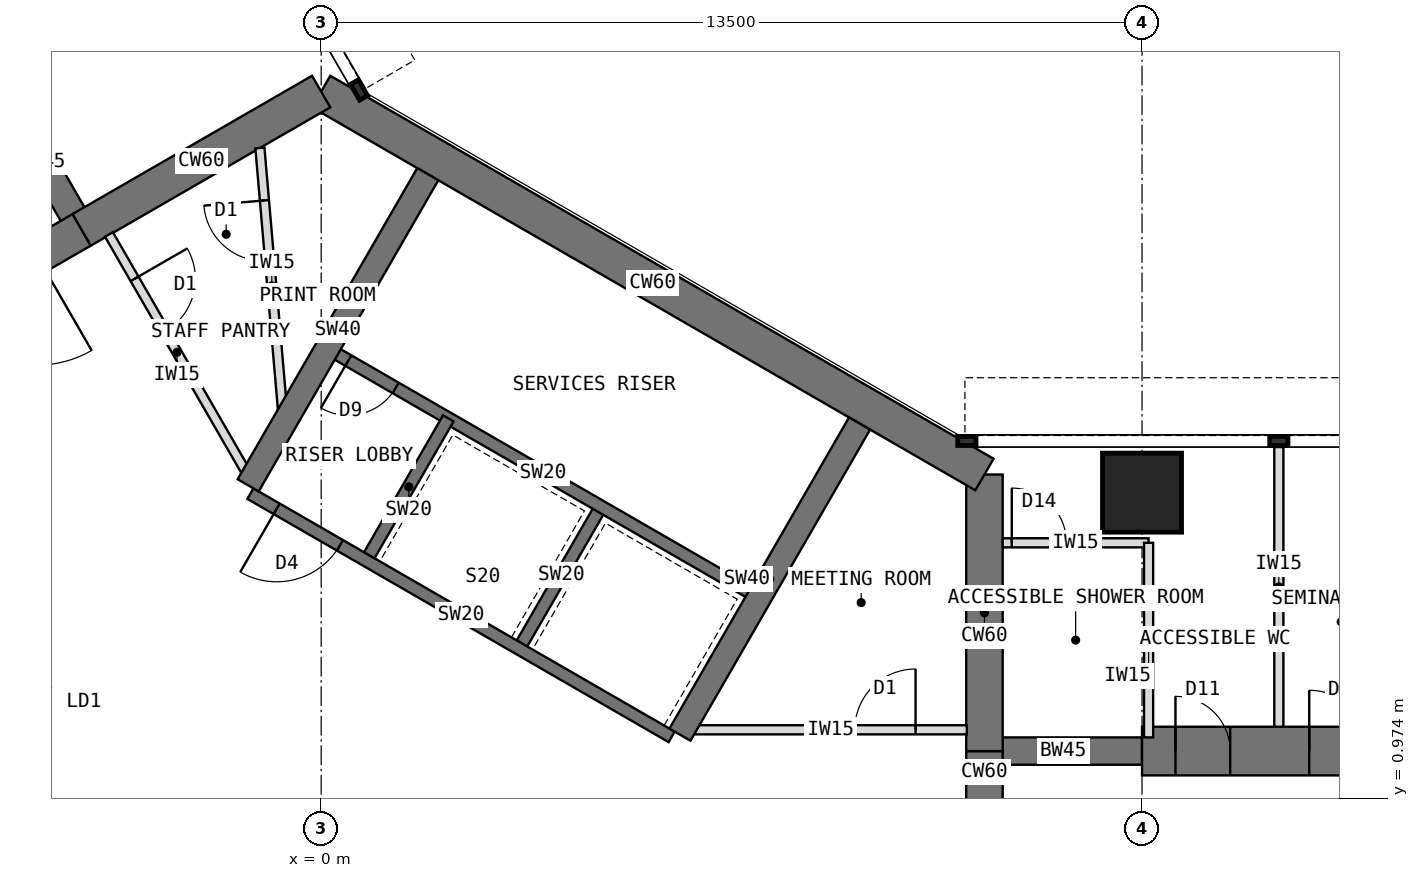
"""IFC4 building model, lengths in metres.
Left out: names, types, materials, properties, quantities, classifications, styles, units other than length and angle.
Written with IfcOpenShell. Run it as: python <this file> out.ifc"""

import sys

from ifc_helpers import new_model, si_unit, direction, frame, frame_2d, origin, origin_2d, place, context, subcontext, project, spatial, rectangle, extrude, element, fill, save


model = new_model("IFC4")
c1 = context("Model", 3, precision=1e-05, world=origin(), true_north=direction((0.0, 1.0)))
c2 = subcontext(c1, "Body", "Model", "MODEL_VIEW")
j1 = project(units=[si_unit("LENGTHUNIT", "METRE"), si_unit("PLANEANGLEUNIT", "RADIAN")], contexts=[c1])
p1 = place(None, origin())
s1 = spatial("IfcSite", under=j1, at=p1, CompositionType="ELEMENT")
p2 = place(p1, origin())
s2 = spatial("IfcBuilding", under=s1, at=p2, CompositionType="ELEMENT")
p3 = place(p2, frame((0.0, 0.0, 133.5)))
s3 = spatial("IfcBuildingStorey", under=s2, at=p3, CompositionType="ELEMENT", Elevation=133.5)
p4 = place(p3, frame((10.908, -1.75, 0.0), z_axis=(0.0, 0.0, 1.0), x_axis=(0.0, 1.0, 0.0)))
e1 = element("IfcWall", 1, at=p4, inside=s3, PredefinedType="SHEAR", context=c2, shape_type="SweptSolid", body=[
    extrude(rectangle(XDim=3.5, YDim=0.6, at=frame_2d((1.75, 0.0))), origin(), (0.0, 0.0, 1.0), 4.0),
])
p5 = place(p4, frame((0.85, 0.0, 0.0)))
e2 = element("IfcOpeningElement", 2, at=p5, cuts=e1, PredefinedType="OPENING", context=c2, shape_type="SweptSolid", body=[
    extrude(rectangle(XDim=1.8, YDim=2.1, at=frame_2d((0.9, 1.05))), frame((0.0, 0.31, 0.0), z_axis=(0.0, -1.0, 0.0), x_axis=(1.0, 0.0, 0.0)), (0.0, 0.0, 1.0), 0.62),
])
p6 = place(p3, frame((10.908, 1.75, 0.0), z_axis=(0.0, 0.0, 1.0), x_axis=(0.0, 1.0, 0.0)))
e3 = element("IfcWall", 3, at=p6, inside=s3, PredefinedType="SHEAR", context=c2, shape_type="SweptSolid", body=[
    extrude(rectangle(XDim=4.548, YDim=0.6, at=frame_2d((2.274, 0.0))), origin(), (0.0, 0.0, 1.0), 4.0),
])
p7 = place(p3, frame((10.908, 6.298, 0.0), z_axis=(0.0, 0.0, 1.0), x_axis=(-0.866021940709, 0.500005998175, 0.0)))
e4 = element("IfcWall", 4, at=p7, inside=s3, PredefinedType="SHEAR", context=c2, shape_type="SweptSolid", body=[
    extrude(rectangle(XDim=12.596, YDim=0.6, at=frame_2d((6.298, 0.0))), origin(), (0.0, 0.0, 1.0), 4.0),
])
p8 = place(p3, frame((0.0, 12.596, 0.0), z_axis=(0.0, 0.0, 1.0), x_axis=(-0.866011268655, -0.500024481964, 0.0)))
e5 = element("IfcWall", 5, at=p8, inside=s3, PredefinedType="SHEAR", context=c2, shape_type="SweptSolid", body=[
    extrude(rectangle(XDim=4.548, YDim=0.6, at=frame_2d((2.274, 0.0))), origin(), (0.0, 0.0, 1.0), 4.0),
])
p9 = place(p3, frame((-3.939, 10.322, 0.0), z_axis=(0.0, 0.0, 1.0), x_axis=(-0.866019471182, -0.500010275428, 0.0)))
e6 = element("IfcWall", 6, at=p9, inside=s3, PredefinedType="SHEAR", context=c2, shape_type="SweptSolid", body=[
    extrude(rectangle(XDim=3.5, YDim=0.6, at=frame_2d((1.75, 0.0))), origin(), (0.0, 0.0, 1.0), 4.0),
])
p10 = place(p9, frame((0.85, 0.0, 0.0)))
e7 = element("IfcOpeningElement", 7, at=p10, cuts=e6, PredefinedType="OPENING", context=c2, shape_type="SweptSolid", body=[
    extrude(rectangle(XDim=1.8, YDim=2.1, at=frame_2d((0.9, 1.05))), frame((0.0, 0.31, 0.0), z_axis=(0.0, -1.0, 0.0), x_axis=(1.0, 0.0, 0.0)), (0.0, 0.0, 1.0), 0.62),
])
p11 = place(p3, frame((10.908, 1.75, 0.0), z_axis=(0.0, 0.0, 1.0), x_axis=(1.0, 0.0, 0.0)))
e8 = element("IfcWall", 8, at=p11, inside=s3, PredefinedType="SHEAR", context=c2, shape_type="SweptSolid", body=[
    extrude(rectangle(XDim=2.592, YDim=0.45, at=frame_2d((1.296, 0.0))), origin(), (0.0, 0.0, 1.0), 4.0),
])
p12 = place(p3, frame((13.5, 1.75, 0.0), z_axis=(0.0, 0.0, 1.0), x_axis=(1.0, 0.0, 0.0)))
e9 = element("IfcWall", 9, at=p12, inside=s3, PredefinedType="SHEAR", context=c2, shape_type="SweptSolid", body=[
    extrude(rectangle(XDim=13.2, YDim=0.8, at=frame_2d((6.6, 0.0))), origin(), (0.0, 0.0, 1.0), 4.0),
])
p13 = place(p12, frame((0.55, 0.0, 0.0)))
e10 = element("IfcOpeningElement", 10, at=p13, cuts=e9, PredefinedType="OPENING", context=c2, shape_type="SweptSolid", body=[
    extrude(rectangle(XDim=0.9, YDim=2.1, at=frame_2d((0.45, 1.05))), frame((0.0, 0.41, 0.0), z_axis=(0.0, -1.0, 0.0), x_axis=(1.0, 0.0, 0.0)), (0.0, 0.0, 1.0), 0.82),
])
p14 = place(p12, frame((2.75, 0.0, 0.0)))
e11 = element("IfcOpeningElement", 11, at=p14, cuts=e9, PredefinedType="OPENING", context=c2, shape_type="SweptSolid", body=[
    extrude(rectangle(XDim=1.0, YDim=2.1, at=frame_2d((0.5, 1.05))), frame((0.0, 0.41, 0.0), z_axis=(0.0, -1.0, 0.0), x_axis=(1.0, 0.0, 0.0)), (0.0, 0.0, 1.0), 0.82),
])
p15 = place(p12, frame((7.25, 0.0, 0.0)))
e12 = element("IfcOpeningElement", 12, at=p15, cuts=e9, PredefinedType="OPENING", context=c2, shape_type="SweptSolid", body=[
    extrude(rectangle(XDim=1.0, YDim=2.1, at=frame_2d((0.5, 1.05))), frame((0.0, 0.41, 0.0), z_axis=(0.0, -1.0, 0.0), x_axis=(1.0, 0.0, 0.0)), (0.0, 0.0, 1.0), 0.82),
])
p16 = place(p3, frame((-3.939, 10.322, 0.0), z_axis=(0.0, 0.0, 1.0), x_axis=(-0.499918158782, 0.866072649678, 0.0)))
e13 = element("IfcWall", 13, at=p16, inside=s3, PredefinedType="SHEAR", context=c2, shape_type="SweptSolid", body=[
    extrude(rectangle(XDim=2.592, YDim=0.45, at=frame_2d((1.296, 0.0))), origin(), (0.0, 0.0, 1.0), 4.0),
])
p17 = place(p3, frame((13.5, 6.0, 0.0), z_axis=(0.0, 0.0, 1.0), x_axis=(1.0, 0.0, 0.0)))
e14 = element("IfcColumn", 14, at=p17, inside=s3, PredefinedType="COLUMN", context=c2, shape_type="SweptSolid", body=[
    extrude(rectangle(XDim=1.3, YDim=1.3, at=origin_2d()), origin(), (0.0, 0.0, 1.0), 4.0),
])
p18 = place(p3, frame((5.764, 1.984, 0.0), z_axis=(0.0, 0.0, 1.0), x_axis=(-0.866026010844, 0.49999894854, 0.0)))
e15 = element("IfcWall", 15, at=p18, inside=s3, PredefinedType="SHEAR", context=c2, shape_type="SweptSolid", body=[
    extrude(rectangle(XDim=8.0, YDim=0.2, at=frame_2d((4.0, 0.0))), origin(), (0.0, 0.0, 1.0), 4.0),
])
p19 = place(p18, frame((6.3, 0.0, 0.0)))
e16 = element("IfcOpeningElement", 16, at=p19, cuts=e15, PredefinedType="OPENING", context=c2, shape_type="SweptSolid", body=[
    extrude(rectangle(XDim=1.2, YDim=2.1, at=frame_2d((0.6, 1.05))), frame((0.0, 0.11, 0.0), z_axis=(0.0, -1.0, 0.0), x_axis=(1.0, 0.0, 0.0)), (0.0, 0.0, 1.0), 0.22),
])
for number, where, z_axis, x_axis in (
    (17, (3.303, 3.52, 0.0), (0.0, 0.0, 1.0), (0.5, 0.866, 0.0)),
    (18, (0.791, 4.97, 0.0), (0.0, 0.0, 1.0), (0.5, 0.866, 0.0)),
):
    element("IfcWall", number, at=place(p3, frame(where, z_axis=z_axis, x_axis=x_axis)), inside=s3, PredefinedType="SHEAR", context=c2, shape_type="SweptSolid", body=[
        extrude(rectangle(XDim=2.6, YDim=0.2, at=frame_2d((1.3, 0.0))), origin(), (0.0, 0.0, 1.0), 4.0),
    ])
p20 = place(p3, frame((7.114, 4.322, 0.0), z_axis=(0.0, 0.0, 1.0), x_axis=(-0.866026010844, 0.49999894854, 0.0)))
e19 = element("IfcWall", 19, at=p20, inside=s3, PredefinedType="SHEAR", context=c2, shape_type="SweptSolid", body=[
    extrude(rectangle(XDim=8.0, YDim=0.2, at=frame_2d((4.0, 0.0))), origin(), (0.0, 0.0, 1.0), 4.0),
])
p21 = place(p20, frame((6.8, 0.0, 0.0)))
e20 = element("IfcOpeningElement", 20, at=p21, cuts=e19, PredefinedType="OPENING", context=c2, shape_type="SweptSolid", body=[
    extrude(rectangle(XDim=0.9, YDim=2.1, at=frame_2d((0.45, 1.05))), frame((0.0, 0.11, 0.0), z_axis=(0.0, -1.0, 0.0), x_axis=(1.0, 0.0, 0.0)), (0.0, 0.0, 1.0), 0.22),
])
p22 = place(p3, frame((-1.201, 6.12, 0.0), z_axis=(0.0, 0.0, 1.0), x_axis=(0.49999668571, 0.866027317282, 0.0)))
e21 = element("IfcWall", 21, at=p22, inside=s3, PredefinedType="SHEAR", context=c2, shape_type="SweptSolid", body=[
    extrude(rectangle(XDim=5.908, YDim=0.4, at=frame_2d((2.954, 0.0))), origin(), (0.0, 0.0, 1.0), 4.0),
])
p23 = place(p3, frame((5.901, 2.02, 0.0), z_axis=(0.0, 0.0, 1.0), x_axis=(0.500027676417, 0.866009424208, 0.0)))
e22 = element("IfcWall", 22, at=p23, inside=s3, PredefinedType="SHEAR", context=c2, shape_type="SweptSolid", body=[
    extrude(rectangle(XDim=5.908, YDim=0.4, at=frame_2d((2.954, 0.0))), origin(), (0.0, 0.0, 1.0), 4.0),
])
p24 = place(p3, frame((15.75, 2.15, 0.0), z_axis=(0.0, 0.0, 1.0), x_axis=(0.0, 1.0, 0.0)))
e23 = element("IfcWall", 23, at=p24, inside=s3, PredefinedType="PARTITIONING", context=c2, shape_type="SweptSolid", body=[
    extrude(rectangle(XDim=4.6, YDim=0.15, at=frame_2d((2.3, 0.0))), origin(), (0.0, 0.0, 1.0), 3.8),
])
p25 = place(p3, frame((11.208, 5.175, 0.0), z_axis=(0.0, 0.0, 1.0), x_axis=(1.0, 0.0, 0.0)))
e24 = element("IfcWall", 24, at=p25, inside=s3, PredefinedType="PARTITIONING", context=c2, shape_type="SweptSolid", body=[
    extrude(rectangle(XDim=2.4, YDim=0.15, at=frame_2d((1.2, 0.0))), origin(), (0.0, 0.0, 1.0), 3.8),
])
p26 = place(p25, frame((0.15, 0.0, 0.0)))
e25 = element("IfcOpeningElement", 25, at=p26, cuts=e24, PredefinedType="OPENING", context=c2, shape_type="SweptSolid", body=[
    extrude(rectangle(XDim=0.9, YDim=2.1, at=frame_2d((0.45, 1.05))), frame((0.0, 0.085, 0.0), z_axis=(0.0, -1.0, 0.0), x_axis=(1.0, 0.0, 0.0)), (0.0, 0.0, 1.0), 0.17),
])
p27 = place(p3, frame((13.608, 1.975, 0.0), z_axis=(0.0, 0.0, 1.0), x_axis=(0.0, 1.0, 0.0)))
e26 = element("IfcWall", 26, at=p27, inside=s3, PredefinedType="PARTITIONING", context=c2, shape_type="SweptSolid", body=[
    extrude(rectangle(XDim=3.2, YDim=0.15, at=frame_2d((1.6, 0.0))), origin(), (0.0, 0.0, 1.0), 3.8),
])
p28 = place(p3, frame((-3.49, 10.246, 0.0), z_axis=(0.0, 0.0, 1.0), x_axis=(0.499999473313, -0.866025707867, 0.0)))
e27 = element("IfcWall", 27, at=p28, inside=s3, PredefinedType="PARTITIONING", context=c2, shape_type="SweptSolid", body=[
    extrude(rectangle(XDim=4.476, YDim=0.15, at=frame_2d((2.238, 0.0))), origin(), (0.0, 0.0, 1.0), 3.8),
])
p29 = place(p28, frame((0.843, 0.0, 0.0)))
e28 = element("IfcOpeningElement", 28, at=p29, cuts=e27, PredefinedType="OPENING", context=c2, shape_type="SweptSolid", body=[
    extrude(rectangle(XDim=1.0, YDim=2.1, at=frame_2d((0.5, 1.05))), frame((0.0, 0.085, 0.0), z_axis=(0.0, -1.0, 0.0), x_axis=(1.0, 0.0, 0.0)), (0.0, 0.0, 1.0), 0.17),
])
p30 = place(p3, frame((6.143, 2.1, 0.0), z_axis=(0.0, 0.0, 1.0), x_axis=(1.0, 0.0, 0.0)))
e29 = element("IfcWall", 29, at=p30, inside=s3, PredefinedType="PARTITIONING", context=c2, shape_type="SweptSolid", body=[
    extrude(rectangle(XDim=4.476, YDim=0.15, at=frame_2d((2.238, 0.0))), origin(), (0.0, 0.0, 1.0), 3.8),
])
p31 = place(p30, frame((2.633, 0.0, 0.0)))
e30 = element("IfcOpeningElement", 30, at=p31, cuts=e29, PredefinedType="OPENING", context=c2, shape_type="SweptSolid", body=[
    extrude(rectangle(XDim=1.0, YDim=2.1, at=frame_2d((0.5, 1.05))), frame((0.0, 0.085, 0.0), z_axis=(0.0, -1.0, 0.0), x_axis=(1.0, 0.0, 0.0)), (0.0, 0.0, 1.0), 0.17),
])
p32 = place(p3, frame((-0.616, 7.133, 0.0), z_axis=(0.0, 0.0, 1.0), x_axis=(-0.086041653535, 0.996291540593, 0.0)))
e31 = element("IfcWall", 31, at=p32, inside=s3, PredefinedType="PARTITIONING", context=c2, shape_type="SweptSolid", body=[
    extrude(rectangle(XDim=4.551, YDim=0.15, at=frame_2d((2.276, 0.0))), origin(), (0.0, 0.0, 1.0), 3.8),
])
p33 = place(p32, frame((2.686, 0.0, 0.0)))
e32 = element("IfcOpeningElement", 32, at=p33, cuts=e31, PredefinedType="OPENING", context=c2, shape_type="SweptSolid", body=[
    extrude(rectangle(XDim=1.0, YDim=2.1, at=frame_2d((0.5, 1.05))), frame((0.0, 0.085, 0.0), z_axis=(0.0, -1.0, 0.0), x_axis=(1.0, 0.0, 0.0)), (0.0, 0.0, 1.0), 0.17),
])
p34 = place(p19, origin())
e33 = element("IfcDoor", 33, at=p34, inside=s3, OperationType="SINGLE_SWING_RIGHT", PredefinedType="DOOR", context=c2, shape_type="SweptSolid", body=[
    extrude(rectangle(XDim=1.2, YDim=2.1, at=frame_2d((0.6, 1.05))), frame((0.0, 0.025, 0.0), z_axis=(0.0, -1.0, 0.0), x_axis=(1.0, 0.0, 0.0)), (0.0, 0.0, 1.0), 0.05),
])
fill(e16, e33)
p35 = place(p21, origin())
e34 = element("IfcDoor", 34, at=p35, inside=s3, OperationType="SINGLE_SWING_RIGHT", PredefinedType="DOOR", context=c2, shape_type="SweptSolid", body=[
    extrude(rectangle(XDim=0.9, YDim=2.1, at=frame_2d((0.45, 1.05))), frame((0.0, 0.025, 0.0), z_axis=(0.0, -1.0, 0.0), x_axis=(1.0, 0.0, 0.0)), (0.0, 0.0, 1.0), 0.05),
])
fill(e20, e34)
p36 = place(p26, origin())
e35 = element("IfcDoor", 35, at=p36, inside=s3, OperationType="SINGLE_SWING_LEFT", PredefinedType="DOOR", context=c2, shape_type="SweptSolid", body=[
    extrude(rectangle(XDim=0.9, YDim=2.1, at=frame_2d((0.45, 1.05))), frame((0.0, 0.025, 0.0), z_axis=(0.0, -1.0, 0.0), x_axis=(1.0, 0.0, 0.0)), (0.0, 0.0, 1.0), 0.05),
])
fill(e25, e35)
p37 = place(p31, origin())
e36 = element("IfcDoor", 36, at=p37, inside=s3, OperationType="SINGLE_SWING_RIGHT", PredefinedType="DOOR", context=c2, shape_type="SweptSolid", body=[
    extrude(rectangle(XDim=1.0, YDim=2.1, at=frame_2d((0.5, 1.05))), frame((0.0, 0.025, 0.0), z_axis=(0.0, -1.0, 0.0), x_axis=(1.0, 0.0, 0.0)), (0.0, 0.0, 1.0), 0.05),
])
fill(e30, e36)
p38 = place(p29, origin())
e37 = element("IfcDoor", 37, at=p38, inside=s3, OperationType="SINGLE_SWING_LEFT", PredefinedType="DOOR", context=c2, shape_type="SweptSolid", body=[
    extrude(rectangle(XDim=1.0, YDim=2.1, at=frame_2d((0.5, 1.05))), frame((0.0, 0.025, 0.0), z_axis=(0.0, -1.0, 0.0), x_axis=(1.0, 0.0, 0.0)), (0.0, 0.0, 1.0), 0.05),
])
fill(e28, e37)
p39 = place(p33, origin())
e38 = element("IfcDoor", 38, at=p39, inside=s3, OperationType="SINGLE_SWING_RIGHT", PredefinedType="DOOR", context=c2, shape_type="SweptSolid", body=[
    extrude(rectangle(XDim=1.0, YDim=2.1, at=frame_2d((0.5, 1.05))), frame((0.0, 0.025, 0.0), z_axis=(0.0, -1.0, 0.0), x_axis=(1.0, 0.0, 0.0)), (0.0, 0.0, 1.0), 0.05),
])
fill(e32, e38)
p40 = place(p13, origin())
e39 = element("IfcDoor", 39, at=p40, inside=s3, OperationType="SINGLE_SWING_LEFT", PredefinedType="DOOR", context=c2, shape_type="SweptSolid", body=[
    extrude(rectangle(XDim=0.82, YDim=2.06, at=frame_2d((0.45, 1.03))), frame((0.0, 0.025, 0.0), z_axis=(0.0, -1.0, 0.0), x_axis=(1.0, 0.0, 0.0)), (0.0, 0.0, 1.0), 0.05),
    extrude(rectangle(XDim=0.04, YDim=2.1, at=frame_2d((0.02, 1.05))), frame((0.0, 0.4, 0.0), z_axis=(0.0, -1.0, 0.0), x_axis=(1.0, 0.0, 0.0)), (0.0, 0.0, 1.0), 0.8),
    extrude(rectangle(XDim=0.04, YDim=2.1, at=frame_2d((0.88, 1.05))), frame((0.0, 0.4, 0.0), z_axis=(0.0, -1.0, 0.0), x_axis=(1.0, 0.0, 0.0)), (0.0, 0.0, 1.0), 0.8),
    extrude(rectangle(XDim=0.82, YDim=0.04, at=frame_2d((0.45, 2.08))), frame((0.0, 0.4, 0.0), z_axis=(0.0, -1.0, 0.0), x_axis=(1.0, 0.0, 0.0)), (0.0, 0.0, 1.0), 0.8),
])
fill(e10, e39)
p41 = place(p14, origin())
e40 = element("IfcDoor", 40, at=p41, inside=s3, OperationType="SINGLE_SWING_LEFT", PredefinedType="DOOR", context=c2, shape_type="SweptSolid", body=[
    extrude(rectangle(XDim=0.92, YDim=2.06, at=frame_2d((0.5, 1.03))), frame((0.0, 0.025, 0.0), z_axis=(0.0, -1.0, 0.0), x_axis=(1.0, 0.0, 0.0)), (0.0, 0.0, 1.0), 0.05),
    extrude(rectangle(XDim=0.04, YDim=2.1, at=frame_2d((0.02, 1.05))), frame((0.0, 0.4, 0.0), z_axis=(0.0, -1.0, 0.0), x_axis=(1.0, 0.0, 0.0)), (0.0, 0.0, 1.0), 0.8),
    extrude(rectangle(XDim=0.04, YDim=2.1, at=frame_2d((0.98, 1.05))), frame((0.0, 0.4, 0.0), z_axis=(0.0, -1.0, 0.0), x_axis=(1.0, 0.0, 0.0)), (0.0, 0.0, 1.0), 0.8),
    extrude(rectangle(XDim=0.92, YDim=0.04, at=frame_2d((0.5, 2.08))), frame((0.0, 0.4, 0.0), z_axis=(0.0, -1.0, 0.0), x_axis=(1.0, 0.0, 0.0)), (0.0, 0.0, 1.0), 0.8),
])
fill(e11, e40)
save(model, sys.argv[1])
